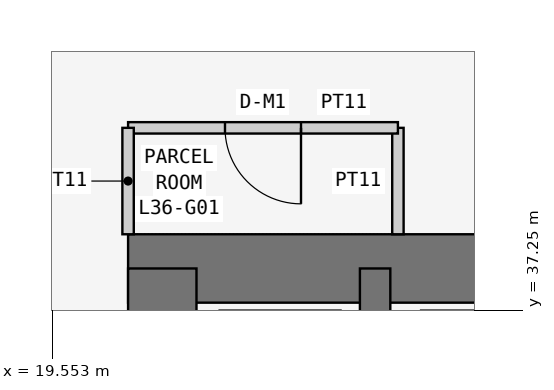
"""IFC4 building model, lengths in metres.
Left out: names, types, materials, properties, quantities, classifications, styles, units other than length and angle.
Written with IfcOpenShell. Run it as: python <this file> out.ifc"""

import sys

from ifc_helpers import new_model, si_unit, direction, frame, frame_2d, origin, place, context, subcontext, project, spatial, rectangle, extrude, element, fill, save


model = new_model("IFC4")
c1 = context("Model", 3, precision=1e-05, world=origin(), true_north=direction((0.0, 1.0)))
c2 = subcontext(c1, "Body", "Model", "MODEL_VIEW")
j1 = project(units=[si_unit("LENGTHUNIT", "METRE"), si_unit("PLANEANGLEUNIT", "RADIAN")], contexts=[c1])
p1 = place(None, origin())
s1 = spatial("IfcSite", under=j1, at=p1, CompositionType="ELEMENT")
p2 = place(p1, origin())
s2 = spatial("IfcBuilding", under=s1, at=p2, CompositionType="ELEMENT")
p3 = place(p2, frame((0.0, 0.0, 141.3)))
s3 = spatial("IfcBuildingStorey", under=s2, at=p3, CompositionType="ELEMENT", Elevation=141.3)
p4 = place(p3, frame((37.8, 37.8, 0.0), z_axis=(0.0, 0.0, 1.0), x_axis=(-1.0, 0.0, 0.0)))
e1 = element("IfcWall", 1, at=p4, inside=s3, PredefinedType="SHEAR", context=c2, shape_type="SweptSolid", body=[
    extrude(rectangle(XDim=17.25, YDim=0.9, at=frame_2d((8.625, 0.0))), origin(), (0.0, 0.0, 1.0), 3.6),
])
p5 = place(p3, frame((21.0, 37.8, 0.0), z_axis=(0.0, 0.0, 1.0), x_axis=(0.0, -1.0, 0.0)))
e2 = element("IfcWall", 2, at=p5, inside=s3, PredefinedType="SHEAR", context=c2, shape_type="SweptSolid", body=[
    extrude(rectangle(XDim=17.25, YDim=0.9, at=frame_2d((8.625, 0.0))), origin(), (0.0, 0.0, 1.0), 3.6),
])
p6 = place(p5, frame((5.4, 0.0, 0.0)))
e3 = element("IfcOpeningElement", 3, at=p6, cuts=e2, PredefinedType="OPENING", context=c2, shape_type="SweptSolid", body=[
    extrude(rectangle(XDim=1.2, YDim=2.1, at=frame_2d((0.6, 1.05))), frame((0.0, 0.46, 0.0), z_axis=(0.0, -1.0, 0.0), x_axis=(1.0, 0.0, 0.0)), (0.0, 0.0, 1.0), 0.92),
])
p7 = place(p3, frame((23.8, 34.6, 0.0), z_axis=(0.0, 0.0, 1.0), x_axis=(0.0, 1.0, 0.0)))
e4 = element("IfcWall", 4, at=p7, inside=s3, PredefinedType="SHEAR", context=c2, shape_type="SweptSolid", body=[
    extrude(rectangle(XDim=3.2, YDim=0.4, at=frame_2d((1.6, 0.0))), origin(), (0.0, 0.0, 1.0), 3.6),
])
p8 = place(p3, frame((24.1, 38.25, 0.0), z_axis=(0.0, 0.0, 1.0), x_axis=(0.0, 1.0, 0.0)))
e5 = element("IfcWall", 5, at=p8, inside=s3, PredefinedType="PARTITIONING", context=c2, shape_type="SweptSolid", body=[
    extrude(rectangle(XDim=1.4, YDim=0.15, at=frame_2d((0.7, 0.0))), origin(), (0.0, 0.0, 1.0), 3.45),
])
p9 = place(p3, frame((24.1, 39.65, 0.0), z_axis=(0.0, 0.0, 1.0), x_axis=(-1.0, 0.0, 0.0)))
e6 = element("IfcWall", 6, at=p9, inside=s3, PredefinedType="PARTITIONING", context=c2, shape_type="SweptSolid", body=[
    extrude(rectangle(XDim=3.55, YDim=0.15, at=frame_2d((1.775, 0.0))), origin(), (0.0, 0.0, 1.0), 3.45),
])
p10 = place(p9, frame((1.275, 0.0, 0.0)))
e7 = element("IfcOpeningElement", 7, at=p10, cuts=e6, PredefinedType="OPENING", context=c2, shape_type="SweptSolid", body=[
    extrude(rectangle(XDim=1.0, YDim=2.1, at=frame_2d((0.5, 1.05))), frame((0.0, 0.085, 0.0), z_axis=(0.0, -1.0, 0.0), x_axis=(1.0, 0.0, 0.0)), (0.0, 0.0, 1.0), 0.17),
])
p11 = place(p3, frame((20.55, 39.65, 0.0), z_axis=(0.0, 0.0, 1.0), x_axis=(0.0, -1.0, 0.0)))
e8 = element("IfcWall", 8, at=p11, inside=s3, PredefinedType="PARTITIONING", context=c2, shape_type="SweptSolid", body=[
    extrude(rectangle(XDim=1.4, YDim=0.15, at=frame_2d((0.7, 0.0))), origin(), (0.0, 0.0, 1.0), 3.45),
])
p12 = place(p10, origin())
e9 = element("IfcDoor", 9, at=p12, inside=s3, OperationType="SINGLE_SWING_LEFT", PredefinedType="DOOR", context=c2, shape_type="SweptSolid", body=[
    extrude(rectangle(XDim=1.0, YDim=2.1, at=frame_2d((0.5, 1.05))), frame((0.0, 0.025, 0.0), z_axis=(0.0, -1.0, 0.0), x_axis=(1.0, 0.0, 0.0)), (0.0, 0.0, 1.0), 0.05),
])
fill(e7, e9)
save(model, sys.argv[1])
